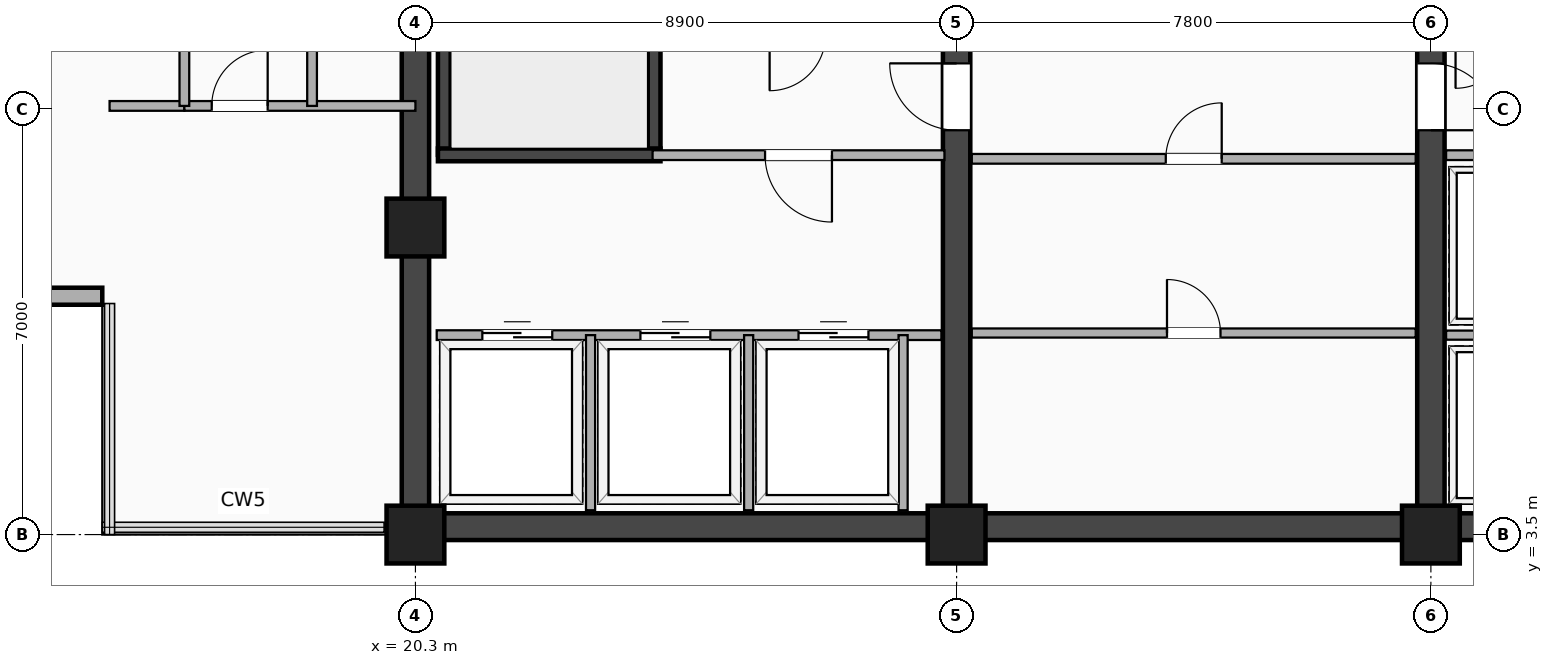
"""IFC4 building model, lengths in metres.
Left out: names, types, materials, properties, quantities, classifications, styles, units other than length and angle.
Written with IfcOpenShell. Run it as: python <this file> out.ifc"""

import sys

from ifc_helpers import new_model, si_unit, direction, frame, frame_2d, origin, origin_2d, place, context, subcontext, project, spatial, rectangle, extrude, element, fill, save


model = new_model("IFC4")
c1 = context("Model", 3, precision=1e-05, world=origin(), true_north=direction((0.0, 1.0)))
c2 = subcontext(c1, "Body", "Model", "MODEL_VIEW")
j1 = project(units=[si_unit("LENGTHUNIT", "METRE"), si_unit("PLANEANGLEUNIT", "RADIAN")], contexts=[c1])
p1 = place(None, origin())
s1 = spatial("IfcSite", under=j1, at=p1, CompositionType="ELEMENT")
p2 = place(p1, origin())
s2 = spatial("IfcBuilding", under=s1, at=p2, CompositionType="ELEMENT")
p3 = place(p2, frame((0.0, 0.0, 192.5)))
s3 = spatial("IfcBuildingStorey", under=s2, at=p3, CompositionType="ELEMENT", Elevation=192.5)
p4 = place(p3, frame((20.3, 3.63, 0.0), z_axis=(0.0, 0.0, 1.0), x_axis=(1.0, 0.0, 0.0)))
e1 = element("IfcWall", 1, at=p4, inside=s3, PredefinedType="SHEAR", context=c2, shape_type="SweptSolid", body=[
    extrude(rectangle(XDim=24.5, YDim=0.44, at=frame_2d((12.25, 0.0))), origin(), (0.0, 0.0, 1.0), 4.16),
])
p5 = place(p3, frame((20.3, 3.5, 0.0), z_axis=(0.0, 0.0, 1.0), x_axis=(0.0, 1.0, 0.0)))
e2 = element("IfcWall", 2, at=p5, inside=s3, PredefinedType="SHEAR", context=c2, shape_type="SweptSolid", body=[
    extrude(rectangle(XDim=16.9, YDim=0.45, at=frame_2d((8.45, 0.0))), origin(), (0.0, 0.0, 1.0), 4.16),
])
p6 = place(p3, frame((29.2, 3.5, 0.0), z_axis=(0.0, 0.0, 1.0), x_axis=(0.0, 1.0, 0.0)))
e3 = element("IfcWall", 3, at=p6, inside=s3, PredefinedType="SHEAR", context=c2, shape_type="SweptSolid", body=[
    extrude(rectangle(XDim=14.95, YDim=0.45, at=frame_2d((7.475, 0.0))), origin(), (0.0, 0.0, 1.0), 4.16),
])
p7 = place(p6, frame((7.75, 0.0, 0.0), z_axis=(0.0, 0.0, 1.0), x_axis=(-1.0, 0.0, 0.0)))
e4 = element("IfcOpeningElement", 4, at=p7, cuts=e3, PredefinedType="OPENING", context=c2, shape_type="SweptSolid", body=[
    extrude(rectangle(XDim=1.1, YDim=2.15, at=frame_2d((0.55, 1.075))), frame((0.0, 0.235, 0.0), z_axis=(0.0, -1.0, 0.0), x_axis=(1.0, 0.0, 0.0)), (0.0, 0.0, 1.0), 0.47),
])
p8 = place(p3, frame((37.0, 3.5, 0.0), z_axis=(0.0, 0.0, 1.0), x_axis=(0.0, 1.0, 0.0)))
e5 = element("IfcWall", 5, at=p8, inside=s3, PredefinedType="SHEAR", context=c2, shape_type="SweptSolid", body=[
    extrude(rectangle(XDim=14.95, YDim=0.45, at=frame_2d((7.475, 0.0))), origin(), (0.0, 0.0, 1.0), 4.16),
])
p9 = place(p8, frame((6.65, 0.0, 0.0)))
e6 = element("IfcOpeningElement", 6, at=p9, cuts=e5, PredefinedType="OPENING", context=c2, shape_type="SweptSolid", body=[
    extrude(rectangle(XDim=1.1, YDim=2.15, at=frame_2d((0.55, 1.075))), frame((0.0, 0.235, 0.0), z_axis=(0.0, -1.0, 0.0), x_axis=(1.0, 0.0, 0.0)), (0.0, 0.0, 1.0), 0.47),
])
for number, where, z_axis, x_axis in (
    (7, (20.775, 9.745, 0.0), (0.0, 0.0, 1.0), (0.0, 1.0, 0.0)),
    (8, (24.225, 9.745, 0.0), (0.0, 0.0, 1.0), (0.0, 1.0, 0.0)),
):
    element("IfcWall", number, at=place(p3, frame(where, z_axis=z_axis, x_axis=x_axis)), inside=s3, PredefinedType="SHEAR", context=c2, shape_type="SweptSolid", body=[
        extrude(rectangle(XDim=8.01, YDim=0.21, at=frame_2d((4.005, 0.0))), origin(), (0.0, 0.0, 1.0), 4.16),
    ])
p10 = place(p3, frame((20.67, 9.745, 0.0), z_axis=(0.0, 0.0, 1.0), x_axis=(1.0, 0.0, 0.0)))
e9 = element("IfcWall", 9, at=p10, inside=s3, PredefinedType="SHEAR", context=c2, shape_type="SweptSolid", body=[
    extrude(rectangle(XDim=3.66, YDim=0.21, at=frame_2d((1.83, 0.0))), origin(), (0.0, 0.0, 1.0), 4.16),
])
for number, where, z_axis, x_axis in (
    (10, (20.3, 3.5, -0.24), (0.0, 0.0, 1.0), (1.0, 0.0, 0.0)),
    (11, (29.2, 3.5, -0.24), (0.0, 0.0, 1.0), (1.0, 0.0, 0.0)),
    (12, (37.0, 3.5, -0.24), (0.0, 0.0, 1.0), (1.0, 0.0, 0.0)),
    (13, (20.3, 8.55, -0.24), (0.0, 0.0, 1.0), (1.0, 0.0, 0.0)),
):
    element("IfcColumn", number, at=place(p3, frame(where, z_axis=z_axis, x_axis=x_axis)), inside=s3, PredefinedType="COLUMN", context=c2, shape_type="SweptSolid", body=[
        extrude(rectangle(XDim=0.95, YDim=0.95, at=origin_2d()), origin(), (0.0, 0.0, 1.0), 4.4),
    ])
p11 = place(p3, frame((11.35, 7.42, 0.0), z_axis=(0.0, 0.0, 1.0), x_axis=(1.0, 0.0, 0.0)))
e14 = element("IfcWall", 14, at=p11, inside=s3, PredefinedType="SOLIDWALL", context=c2, shape_type="SweptSolid", body=[
    extrude(rectangle(XDim=3.8, YDim=0.28, at=frame_2d((1.9, 0.0))), origin(), (0.0, 0.0, 1.0), 4.16),
])
p12 = place(p11, frame((1.025, 0.0, 0.85)))
e15 = element("IfcOpeningElement", 15, at=p12, cuts=e14, PredefinedType="OPENING", context=c2, shape_type="SweptSolid", body=[
    extrude(rectangle(XDim=1.75, YDim=1.65, at=frame_2d((0.875, 0.825))), frame((0.0, 0.15, 0.0), z_axis=(0.0, -1.0, 0.0), x_axis=(1.0, 0.0, 0.0)), (0.0, 0.0, 1.0), 0.3),
])
p13 = place(p3, frame((20.65, 6.78, 0.0), z_axis=(0.0, 0.0, 1.0), x_axis=(1.0, 0.0, 0.0)))
e16 = element("IfcWall", 16, at=p13, inside=s3, PredefinedType="PARTITIONING", context=c2, shape_type="SweptSolid", body=[
    extrude(rectangle(XDim=8.3, YDim=0.16, at=frame_2d((4.15, 0.0))), origin(), (0.0, 0.0, 1.0), 3.372),
])
p14 = place(p13, frame((0.75, 0.0, 0.0)))
e17 = element("IfcOpeningElement", 17, at=p14, cuts=e16, PredefinedType="OPENING", context=c2, shape_type="SweptSolid", body=[
    extrude(rectangle(XDim=1.15, YDim=2.2, at=frame_2d((0.575, 1.1))), frame((0.0, 0.09, 0.0), z_axis=(0.0, -1.0, 0.0), x_axis=(1.0, 0.0, 0.0)), (0.0, 0.0, 1.0), 0.18),
])
p15 = place(p13, frame((3.35, 0.0, 0.0)))
e18 = element("IfcOpeningElement", 18, at=p15, cuts=e16, PredefinedType="OPENING", context=c2, shape_type="SweptSolid", body=[
    extrude(rectangle(XDim=1.15, YDim=2.2, at=frame_2d((0.575, 1.1))), frame((0.0, 0.09, 0.0), z_axis=(0.0, -1.0, 0.0), x_axis=(1.0, 0.0, 0.0)), (0.0, 0.0, 1.0), 0.18),
])
p16 = place(p13, frame((5.95, 0.0, 0.0)))
e19 = element("IfcOpeningElement", 19, at=p16, cuts=e16, PredefinedType="OPENING", context=c2, shape_type="SweptSolid", body=[
    extrude(rectangle(XDim=1.15, YDim=2.2, at=frame_2d((0.575, 1.1))), frame((0.0, 0.09, 0.0), z_axis=(0.0, -1.0, 0.0), x_axis=(1.0, 0.0, 0.0)), (0.0, 0.0, 1.0), 0.18),
])
for number, where, z_axis, x_axis in (
    (20, (23.18, 3.9, 0.0), (0.0, 0.0, 1.0), (0.0, 1.0, 0.0)),
    (21, (25.78, 3.9, 0.0), (0.0, 0.0, 1.0), (0.0, 1.0, 0.0)),
    (22, (28.32, 3.9, 0.0), (0.0, 0.0, 1.0), (0.0, 1.0, 0.0)),
):
    element("IfcWall", number, at=place(p3, frame(where, z_axis=z_axis, x_axis=x_axis)), inside=s3, PredefinedType="PARTITIONING", context=c2, shape_type="SweptSolid", body=[
        extrude(rectangle(XDim=2.88, YDim=0.15, at=frame_2d((1.44, 0.0))), origin(), (0.0, 0.0, 1.0), 4.16),
    ])
p17 = place(p3, frame((24.2, 9.74, 0.0), z_axis=(0.0, 0.0, 1.0), x_axis=(1.0, 0.0, 0.0)))
e23 = element("IfcWall", 23, at=p17, inside=s3, PredefinedType="PARTITIONING", context=c2, shape_type="SweptSolid", body=[
    extrude(rectangle(XDim=4.8, YDim=0.16, at=frame_2d((2.4, 0.0))), origin(), (0.0, 0.0, 1.0), 4.16),
])
p18 = place(p17, frame((1.85, 0.0, 0.0)))
e24 = element("IfcOpeningElement", 24, at=p18, cuts=e23, PredefinedType="OPENING", context=c2, shape_type="SweptSolid", body=[
    extrude(rectangle(XDim=1.1, YDim=2.15, at=frame_2d((0.55, 1.075))), frame((0.0, 0.09, 0.0), z_axis=(0.0, -1.0, 0.0), x_axis=(1.0, 0.0, 0.0)), (0.0, 0.0, 1.0), 0.18),
])
p19 = place(p3, frame((37.25, 6.78, 0.0), z_axis=(0.0, 0.0, 1.0), x_axis=(1.0, 0.0, 0.0)))
e25 = element("IfcWall", 25, at=p19, inside=s3, PredefinedType="PARTITIONING", context=c2, shape_type="SweptSolid", body=[
    extrude(rectangle(XDim=2.17, YDim=0.15, at=frame_2d((1.085, 0.0))), origin(), (0.0, 0.0, 1.0), 4.16),
])
p20 = place(p3, frame((37.25, 9.74, 0.0), z_axis=(0.0, 0.0, 1.0), x_axis=(1.0, 0.0, 0.0)))
e26 = element("IfcWall", 26, at=p20, inside=s3, PredefinedType="PARTITIONING", context=c2, shape_type="SweptSolid", body=[
    extrude(rectangle(XDim=2.17, YDim=0.16, at=frame_2d((1.085, 0.0))), origin(), (0.0, 0.0, 1.0), 4.16),
])
p21 = place(p3, frame((29.45, 9.68, 0.0), z_axis=(0.0, 0.0, 1.0), x_axis=(1.0, 0.0, 0.0)))
e27 = element("IfcWall", 27, at=p21, inside=s3, PredefinedType="PARTITIONING", context=c2, shape_type="SweptSolid", body=[
    extrude(rectangle(XDim=7.3, YDim=0.16, at=frame_2d((3.65, 0.0))), origin(), (0.0, 0.0, 1.0), 4.16),
])
p22 = place(p21, frame((4.11, 0.0, 0.0), z_axis=(0.0, 0.0, 1.0), x_axis=(-1.0, 0.0, 0.0)))
e28 = element("IfcOpeningElement", 28, at=p22, cuts=e27, PredefinedType="OPENING", context=c2, shape_type="SweptSolid", body=[
    extrude(rectangle(XDim=0.92, YDim=2.08, at=frame_2d((0.46, 1.04))), frame((0.0, 0.09, 0.0), z_axis=(0.0, -1.0, 0.0), x_axis=(1.0, 0.0, 0.0)), (0.0, 0.0, 1.0), 0.18),
])
p23 = place(p3, frame((29.45, 6.815, 0.0), z_axis=(0.0, 0.0, 1.0), x_axis=(1.0, 0.0, 0.0)))
e29 = element("IfcWall", 29, at=p23, inside=s3, PredefinedType="PARTITIONING", context=c2, shape_type="SweptSolid", body=[
    extrude(rectangle(XDim=7.3, YDim=0.15, at=frame_2d((3.65, 0.0))), origin(), (0.0, 0.0, 1.0), 4.16),
])
p24 = place(p23, frame((4.09, 0.0, 0.0), z_axis=(0.0, 0.0, 1.0), x_axis=(-1.0, 0.0, 0.0)))
e30 = element("IfcOpeningElement", 30, at=p24, cuts=e29, PredefinedType="OPENING", context=c2, shape_type="SweptSolid", body=[
    extrude(rectangle(XDim=0.88, YDim=2.08, at=frame_2d((0.44, 1.04))), frame((0.0, 0.085, 0.0), z_axis=(0.0, -1.0, 0.0), x_axis=(1.0, 0.0, 0.0)), (0.0, 0.0, 1.0), 0.17),
])
p25 = place(p3, frame((15.27, 10.55, 0.0), z_axis=(0.0, 0.0, 1.0), x_axis=(1.0, 0.0, 0.0)))
e31 = element("IfcWall", 31, at=p25, inside=s3, PredefinedType="PARTITIONING", context=c2, shape_type="SweptSolid", body=[
    extrude(rectangle(XDim=1.23, YDim=0.16, at=frame_2d((0.615, 0.0))), origin(), (0.0, 0.0, 1.0), 4.16),
])
p26 = place(p3, frame((16.5, 10.55, 0.0), z_axis=(0.0, 0.0, 1.0), x_axis=(1.0, 0.0, 0.0)))
e32 = element("IfcWall", 32, at=p26, inside=s3, PredefinedType="PARTITIONING", context=c2, shape_type="SweptSolid", body=[
    extrude(rectangle(XDim=3.8, YDim=0.16, at=frame_2d((1.9, 0.0))), origin(), (0.0, 0.0, 1.0), 3.372),
])
p27 = place(p26, frame((1.37, 0.0, 0.0), z_axis=(0.0, 0.0, 1.0), x_axis=(-1.0, 0.0, 0.0)))
e33 = element("IfcOpeningElement", 33, at=p27, cuts=e32, PredefinedType="OPENING", context=c2, shape_type="SweptSolid", body=[
    extrude(rectangle(XDim=0.92, YDim=2.08, at=frame_2d((0.46, 1.04))), frame((0.0, 0.09, 0.0), z_axis=(0.0, -1.0, 0.0), x_axis=(1.0, 0.0, 0.0)), (0.0, 0.0, 1.0), 0.18),
])
p28 = place(p3, frame((16.5, 10.55, 0.0), z_axis=(0.0, 0.0, 1.0), x_axis=(0.0, 1.0, 0.0)))
e34 = element("IfcWall", 34, at=p28, inside=s3, PredefinedType="PARTITIONING", context=c2, shape_type="SweptSolid", body=[
    extrude(rectangle(XDim=4.03, YDim=0.16, at=frame_2d((2.015, 0.0))), origin(), (0.0, 0.0, 1.0), 3.898),
])
p29 = place(p28, frame((1.4, 0.0, 0.0)))
e35 = element("IfcOpeningElement", 35, at=p29, cuts=e34, PredefinedType="OPENING", context=c2, shape_type="SweptSolid", body=[
    extrude(rectangle(XDim=0.92, YDim=2.08, at=frame_2d((0.46, 1.04))), frame((0.0, 0.09, 0.0), z_axis=(0.0, -1.0, 0.0), x_axis=(1.0, 0.0, 0.0)), (0.0, 0.0, 1.0), 0.18),
])
p30 = place(p3, frame((18.6, 10.55, 0.0), z_axis=(0.0, 0.0, 1.0), x_axis=(0.0, 1.0, 0.0)))
e36 = element("IfcWall", 36, at=p30, inside=s3, PredefinedType="PARTITIONING", context=c2, shape_type="SweptSolid", body=[
    extrude(rectangle(XDim=9.87, YDim=0.16, at=frame_2d((4.935, 0.0))), origin(), (0.0, 0.0, 1.0), 3.372),
])
p31 = place(p30, frame((5.08, 0.0, 0.0), z_axis=(0.0, 0.0, 1.0), x_axis=(-1.0, 0.0, 0.0)))
e37 = element("IfcOpeningElement", 37, at=p31, cuts=e36, PredefinedType="OPENING", context=c2, shape_type="SweptSolid", body=[
    extrude(rectangle(XDim=0.88, YDim=2.08, at=frame_2d((0.44, 1.04))), frame((0.0, 0.09, 0.0), z_axis=(0.0, -1.0, 0.0), x_axis=(1.0, 0.0, 0.0)), (0.0, 0.0, 1.0), 0.18),
])
p32 = place(p7, origin())
e38 = element("IfcDoor", 38, at=p32, inside=s3, OperationType="SINGLE_SWING_RIGHT", PredefinedType="DOOR", context=c2, shape_type="SweptSolid", body=[
    extrude(rectangle(XDim=1.1, YDim=2.15, at=frame_2d((0.55, 1.075))), frame((0.0, 0.025, 0.0), z_axis=(0.0, -1.0, 0.0), x_axis=(1.0, 0.0, 0.0)), (0.0, 0.0, 1.0), 0.05),
])
fill(e4, e38)
p33 = place(p9, origin())
e39 = element("IfcDoor", 39, at=p33, inside=s3, OperationType="SINGLE_SWING_LEFT", PredefinedType="DOOR", context=c2, shape_type="SweptSolid", body=[
    extrude(rectangle(XDim=1.1, YDim=2.15, at=frame_2d((0.55, 1.075))), frame((0.0, 0.025, 0.0), z_axis=(0.0, -1.0, 0.0), x_axis=(1.0, 0.0, 0.0)), (0.0, 0.0, 1.0), 0.05),
])
fill(e6, e39)
p34 = place(p14, origin())
e40 = element("IfcDoor", 40, at=p34, inside=s3, OperationType="DOUBLE_DOOR_SLIDING", PredefinedType="DOOR", context=c2, shape_type="SweptSolid", body=[
    extrude(rectangle(XDim=1.15, YDim=2.2, at=frame_2d((0.575, 1.1))), frame((0.0, 0.025, 0.0), z_axis=(0.0, -1.0, 0.0), x_axis=(1.0, 0.0, 0.0)), (0.0, 0.0, 1.0), 0.05),
])
fill(e17, e40)
p35 = place(p15, origin())
e41 = element("IfcDoor", 41, at=p35, inside=s3, OperationType="DOUBLE_DOOR_SLIDING", PredefinedType="DOOR", context=c2, shape_type="SweptSolid", body=[
    extrude(rectangle(XDim=1.15, YDim=2.2, at=frame_2d((0.575, 1.1))), frame((0.0, 0.025, 0.0), z_axis=(0.0, -1.0, 0.0), x_axis=(1.0, 0.0, 0.0)), (0.0, 0.0, 1.0), 0.05),
])
fill(e18, e41)
p36 = place(p16, origin())
e42 = element("IfcDoor", 42, at=p36, inside=s3, OperationType="DOUBLE_DOOR_SLIDING", PredefinedType="DOOR", context=c2, shape_type="SweptSolid", body=[
    extrude(rectangle(XDim=1.15, YDim=2.2, at=frame_2d((0.575, 1.1))), frame((0.0, 0.025, 0.0), z_axis=(0.0, -1.0, 0.0), x_axis=(1.0, 0.0, 0.0)), (0.0, 0.0, 1.0), 0.05),
])
fill(e19, e42)
p37 = place(p18, origin())
e43 = element("IfcDoor", 43, at=p37, inside=s3, OperationType="SINGLE_SWING_RIGHT", PredefinedType="DOOR", context=c2, shape_type="SweptSolid", body=[
    extrude(rectangle(XDim=1.1, YDim=2.15, at=frame_2d((0.55, 1.075))), frame((0.0, 0.025, 0.0), z_axis=(0.0, -1.0, 0.0), x_axis=(1.0, 0.0, 0.0)), (0.0, 0.0, 1.0), 0.05),
])
fill(e24, e43)
p38 = place(p22, origin())
e44 = element("IfcDoor", 44, at=p38, inside=s3, OperationType="SINGLE_SWING_RIGHT", PredefinedType="DOOR", context=c2, shape_type="SweptSolid", body=[
    extrude(rectangle(XDim=0.92, YDim=2.08, at=frame_2d((0.46, 1.04))), frame((0.0, 0.025, 0.0), z_axis=(0.0, -1.0, 0.0), x_axis=(1.0, 0.0, 0.0)), (0.0, 0.0, 1.0), 0.05),
])
fill(e28, e44)
p39 = place(p24, origin())
e45 = element("IfcDoor", 45, at=p39, inside=s3, OperationType="SINGLE_SWING_LEFT", PredefinedType="DOOR", context=c2, shape_type="SweptSolid", body=[
    extrude(rectangle(XDim=0.88, YDim=2.08, at=frame_2d((0.44, 1.04))), frame((0.0, 0.025, 0.0), z_axis=(0.0, -1.0, 0.0), x_axis=(1.0, 0.0, 0.0)), (0.0, 0.0, 1.0), 0.05),
])
fill(e30, e45)
p40 = place(p27, origin())
e46 = element("IfcDoor", 46, at=p40, inside=s3, OperationType="SINGLE_SWING_RIGHT", PredefinedType="DOOR", context=c2, shape_type="SweptSolid", body=[
    extrude(rectangle(XDim=0.92, YDim=2.08, at=frame_2d((0.46, 1.04))), frame((0.0, 0.025, 0.0), z_axis=(0.0, -1.0, 0.0), x_axis=(1.0, 0.0, 0.0)), (0.0, 0.0, 1.0), 0.05),
])
fill(e33, e46)
save(model, sys.argv[1])
